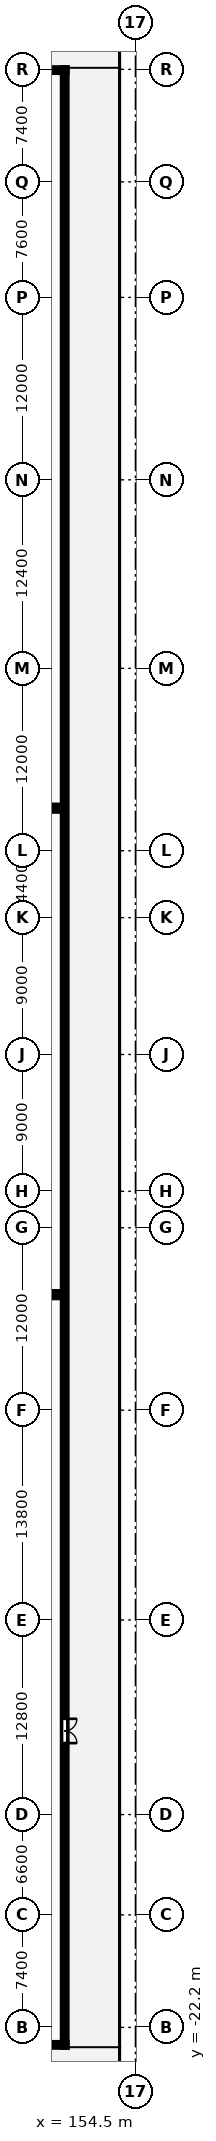
"""IFC4 building model, lengths in metres.
Left out: names, types, materials, properties, quantities, classifications, styles, units other than length and angle.
Written with IfcOpenShell. Run it as: python <this file> out.ifc"""

import sys

from ifc_helpers import new_model, si_unit, direction, frame, frame_2d, origin, origin_2d, place, context, subcontext, project, spatial, rectangle, i_section, extrude, element, fill, save


model = new_model("IFC4")
c1 = context("Model", 3, precision=1e-05, world=origin(), true_north=direction((0.0, 1.0)))
c2 = subcontext(c1, "Body", "Model", "MODEL_VIEW")
j1 = project(units=[si_unit("LENGTHUNIT", "METRE"), si_unit("PLANEANGLEUNIT", "RADIAN")], contexts=[c1])
p1 = place(None, origin())
s1 = spatial("IfcSite", under=j1, at=p1, CompositionType="ELEMENT")
p2 = place(p1, origin())
s2 = spatial("IfcBuilding", under=s1, at=p2, CompositionType="ELEMENT")
p3 = place(p2, frame((0.0, 0.0, 5.4)))
s3 = spatial("IfcBuildingStorey", under=s2, at=p3, CompositionType="ELEMENT", Elevation=5.4)
for number, where, z_axis, x_axis in (
    (1, (149.3, 26.0, 0.0), (0.0, 0.0, 1.0), (1.0, 0.0, 0.0)),
    (2, (149.3, 58.0, 0.0), (0.0, 0.0, 1.0), (1.0, 0.0, 0.0)),
):
    element("IfcColumn", number, at=place(p3, frame(where, z_axis=z_axis, x_axis=x_axis)), inside=s3, PredefinedType="COLUMN", context=c2, shape_type="SweptSolid", body=[
        extrude(i_section(OverallWidth=0.399, OverallDepth=0.394, WebThickness=0.023, FlangeThickness=0.037, FilletRadius=0.015, at=origin_2d()), origin(), (0.0, 0.0, 1.0), 4.36),
    ])
p4 = place(p3, frame((110.0, -23.35, 0.0), z_axis=(0.0, 0.0, 1.0), x_axis=(1.0, 0.0, 0.0)))
e3 = element("IfcWall", 3, at=p4, inside=s3, PredefinedType="STANDARD", context=c2, shape_type="SweptSolid", body=[
    extrude(rectangle(XDim=40.0, YDim=0.3, at=frame_2d((20.0, 0.0))), origin(), (0.0, 0.0, 1.0), 4.3),
])
p5 = place(p3, frame((150.0, 106.55, 0.0), z_axis=(0.0, 0.0, 1.0), x_axis=(-1.0, 0.0, 0.0)))
e4 = element("IfcWall", 4, at=p5, inside=s3, PredefinedType="STANDARD", context=c2, shape_type="SweptSolid", body=[
    extrude(rectangle(XDim=42.0, YDim=0.3, at=frame_2d((21.0, 0.0))), origin(), (0.0, 0.0, 1.0), 4.3),
])
p6 = place(p5, frame((10.0, 0.0, 0.0)))
e5 = element("IfcOpeningElement", 5, at=p6, cuts=e4, PredefinedType="OPENING", context=c2, shape_type="SweptSolid", body=[
    extrude(rectangle(XDim=1.6, YDim=2.2, at=frame_2d((0.8, 1.1))), frame((0.0, 0.16, 0.0), z_axis=(0.0, -1.0, 0.0), x_axis=(1.0, 0.0, 0.0)), (0.0, 0.0, 1.0), 0.32),
])
p7 = place(p3, frame((149.85, -23.5, 0.0), z_axis=(0.0, 0.0, 1.0), x_axis=(0.0, 1.0, 0.0)))
e6 = element("IfcWall", 6, at=p7, inside=s3, PredefinedType="STANDARD", context=c2, shape_type="SweptSolid", body=[
    extrude(rectangle(XDim=130.2, YDim=0.3, at=frame_2d((65.1, 0.0))), origin(), (0.0, 0.0, 1.0), 4.3),
])
p8 = place(p7, frame((20.0, 0.0, 0.0)))
e7 = element("IfcOpeningElement", 7, at=p8, cuts=e6, PredefinedType="OPENING", context=c2, shape_type="SweptSolid", body=[
    extrude(rectangle(XDim=1.6, YDim=2.2, at=frame_2d((0.8, 1.1))), frame((0.0, 0.16, 0.0), z_axis=(0.0, -1.0, 0.0), x_axis=(1.0, 0.0, 0.0)), (0.0, 0.0, 1.0), 0.32),
])
p9 = place(p8, frame((1.6, 0.0, 0.0), z_axis=(0.0, 0.0, 1.0), x_axis=(-1.0, 0.0, 0.0)))
e8 = element("IfcDoor", 8, at=p9, inside=s3, OperationType="DOUBLE_DOOR_SINGLE_SWING", PredefinedType="DOOR", context=c2, shape_type="SweptSolid", body=[
    extrude(rectangle(XDim=1.6, YDim=2.2, at=frame_2d((0.8, 1.1))), frame((0.0, 0.025, 0.0), z_axis=(0.0, -1.0, 0.0), x_axis=(1.0, 0.0, 0.0)), (0.0, 0.0, 1.0), 0.05),
])
fill(e7, e8)
save(model, sys.argv[1])
